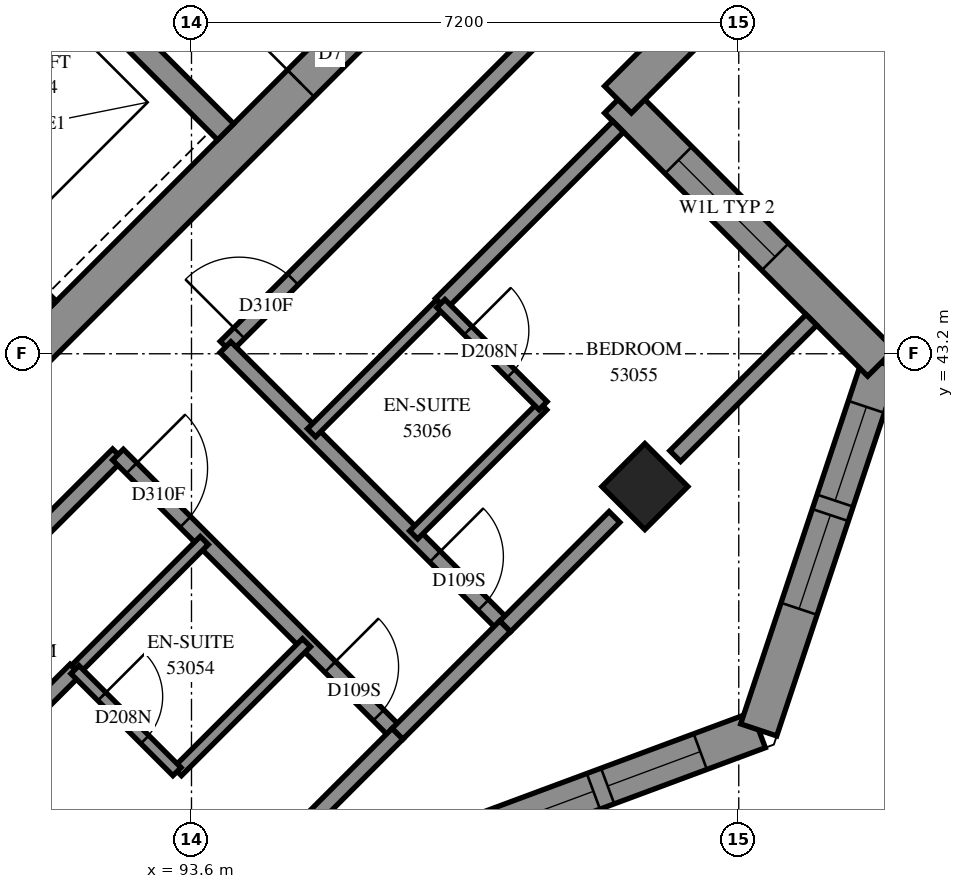
"""IFC4 building model, lengths in metres.
Left out: names, types, materials, properties, quantities, classifications, styles, units other than length and angle.
Written with IfcOpenShell. Run it as: python <this file> out.ifc"""

import sys

from ifc_helpers import new_model, si_unit, direction, frame, frame_2d, origin, origin_2d, place, context, subcontext, project, spatial, polyline, rectangle, outline, extrude, element, fill, save


model = new_model("IFC4")
c1 = context("Model", 3, precision=1e-05, world=origin(), true_north=direction((0.0, 1.0)))
c2 = subcontext(c1, "Body", "Model", "MODEL_VIEW")
j1 = project(units=[si_unit("LENGTHUNIT", "METRE"), si_unit("PLANEANGLEUNIT", "RADIAN")], contexts=[c1])
p1 = place(None, origin())
s1 = spatial("IfcSite", under=j1, at=p1, CompositionType="ELEMENT")
p2 = place(p1, origin())
s2 = spatial("IfcBuilding", under=s1, at=p2, CompositionType="ELEMENT")
p3 = place(p2, frame((0.0, 0.0, 196.4)))
s3 = spatial("IfcBuildingStorey", under=s2, at=p3, CompositionType="ELEMENT", Elevation=196.4)
p4 = place(p3, frame((99.565, 41.453, 0.0), z_axis=(0.0, 0.0, 1.0), x_axis=(0.7071067812, -0.7071067812, 0.0)))
e1 = element("IfcColumn", 1, at=p4, inside=s3, PredefinedType="COLUMN", context=c2, shape_type="SweptSolid", body=[
    extrude(rectangle(XDim=0.8, YDim=0.8, at=origin_2d()), origin(), (0.0, 0.0, 1.0), 3.1),
])
p5 = place(p3, frame((87.013, 38.731, -0.3), z_axis=(0.0, 0.0, 1.0), x_axis=(0.7071067812, 0.7071067812, 0.0)))
e2 = element("IfcWall", 2, at=p5, inside=s3, PredefinedType="SHEAR", context=c2, shape_type="SweptSolid", body=[
    extrude(rectangle(XDim=14.4, YDim=0.5, at=frame_2d((7.2, 0.0))), origin(), (0.0, 0.0, 1.0), 2.7),
])
p6 = place(p5, frame((4.55, 0.0, 0.3)))
e3 = element("IfcOpeningElement", 3, at=p6, cuts=e2, PredefinedType="OPENING", context=c2, shape_type="SweptSolid", body=[
    extrude(rectangle(XDim=1.1, YDim=2.1, at=frame_2d((0.55, 1.05))), frame((0.0, 0.26, 0.0), z_axis=(0.0, -1.0, 0.0), x_axis=(1.0, 0.0, 0.0)), (0.0, 0.0, 1.0), 0.52),
])
p7 = place(p5, frame((11.35, 0.0, 0.3)))
e4 = element("IfcOpeningElement", 4, at=p7, cuts=e2, PredefinedType="OPENING", context=c2, shape_type="SweptSolid", body=[
    extrude(rectangle(XDim=1.1, YDim=2.1, at=frame_2d((0.55, 1.05))), frame((0.0, 0.26, 0.0), z_axis=(0.0, -1.0, 0.0), x_axis=(1.0, 0.0, 0.0)), (0.0, 0.0, 1.0), 0.52),
])
p8 = place(p3, frame((81.534, 53.969, 0.0), z_axis=(0.0, 0.0, 1.0), x_axis=(0.707103309, -0.7071102534, 0.0)))
e5 = element("IfcWall", 5, at=p8, inside=s3, PredefinedType="SOLIDWALL", context=c2, shape_type="SweptSolid", body=[
    extrude(rectangle(XDim=14.4, YDim=0.3, at=frame_2d((7.2, 0.0))), origin(), (0.0, 0.0, 1.0), 3.1),
])
p9 = place(p8, frame((1.25, 0.0, 0.0)))
e6 = element("IfcOpeningElement", 6, at=p9, cuts=e5, PredefinedType="OPENING", context=c2, shape_type="SweptSolid", body=[
    extrude(rectangle(XDim=1.1, YDim=2.1, at=frame_2d((0.55, 1.05))), frame((0.0, 0.16, 0.0), z_axis=(0.0, -1.0, 0.0), x_axis=(1.0, 0.0, 0.0)), (0.0, 0.0, 1.0), 0.32),
])
p10 = place(p8, frame((4.85, 0.0, 0.0)))
e7 = element("IfcOpeningElement", 7, at=p10, cuts=e5, PredefinedType="OPENING", context=c2, shape_type="SweptSolid", body=[
    extrude(rectangle(XDim=1.1, YDim=2.1, at=frame_2d((0.55, 1.05))), frame((0.0, 0.16, 0.0), z_axis=(0.0, -1.0, 0.0), x_axis=(1.0, 0.0, 0.0)), (0.0, 0.0, 1.0), 0.32),
])
p11 = place(p8, frame((8.45, 0.0, 0.0)))
e8 = element("IfcOpeningElement", 8, at=p11, cuts=e5, PredefinedType="OPENING", context=c2, shape_type="SweptSolid", body=[
    extrude(rectangle(XDim=1.1, YDim=2.1, at=frame_2d((0.55, 1.05))), frame((0.0, 0.16, 0.0), z_axis=(0.0, -1.0, 0.0), x_axis=(1.0, 0.0, 0.0)), (0.0, 0.0, 1.0), 0.32),
])
p12 = place(p8, frame((12.05, 0.0, 0.0)))
e9 = element("IfcOpeningElement", 9, at=p12, cuts=e5, PredefinedType="OPENING", context=c2, shape_type="SweptSolid", body=[
    extrude(rectangle(XDim=1.1, YDim=2.1, at=frame_2d((0.55, 1.05))), frame((0.0, 0.16, 0.0), z_axis=(0.0, -1.0, 0.0), x_axis=(1.0, 0.0, 0.0)), (0.0, 0.0, 1.0), 0.32),
])
p13 = place(p3, frame((88.958, 51.211, 0.0), z_axis=(0.0, 0.0, 1.0), x_axis=(0.7070998367, -0.7071137256, 0.0)))
e10 = element("IfcWall", 10, at=p13, inside=s3, PredefinedType="SOLIDWALL", context=c2, shape_type="SweptSolid", body=[
    extrude(rectangle(XDim=7.2, YDim=0.3, at=frame_2d((3.6, 0.0))), origin(), (0.0, 0.0, 1.0), 3.1),
])
p14 = place(p3, frame((96.118, 36.415, 0.0), z_axis=(0.0, 0.0, 1.0), x_axis=(0.9374238577, 0.3481903374, 0.0)))
e11 = element("IfcWall", 11, at=p14, inside=s3, PredefinedType="SOLIDWALL", context=c2, shape_type="SweptSolid", body=[
    extrude(outline(polyline([(0.115, -0.25), (5.395, -0.25), (5.155, 0.25), (-0.115, 0.25), (0.115, -0.25)])), origin(), (0.0, 0.0, 1.0), 3.1),
])
p15 = place(p14, frame((1.655, 0.0, 0.45)))
e12 = element("IfcOpeningElement", 12, at=p15, cuts=e11, PredefinedType="OPENING", context=c2, shape_type="SweptSolid", body=[
    extrude(rectangle(XDim=1.3, YDim=2.5, at=frame_2d((0.65, 1.25))), frame((0.0, 0.26, 0.0), z_axis=(0.0, -1.0, 0.0), x_axis=(1.0, 0.0, 0.0)), (0.0, 0.0, 1.0), 0.52),
])
p16 = place(p14, frame((3.155, 0.0, 0.45)))
e13 = element("IfcOpeningElement", 13, at=p16, cuts=e11, PredefinedType="OPENING", context=c2, shape_type="SweptSolid", body=[
    extrude(rectangle(XDim=1.3, YDim=2.5, at=frame_2d((0.65, 1.25))), frame((0.0, 0.26, 0.0), z_axis=(0.0, -1.0, 0.0), x_axis=(1.0, 0.0, 0.0)), (0.0, 0.0, 1.0), 0.52),
])
p17 = place(p3, frame((101.062, 38.252, 0.0), z_axis=(0.0, 0.0, 1.0), x_axis=(0.3162395484, 0.9486793705, 0.0)))
e14 = element("IfcWall", 14, at=p17, inside=s3, PredefinedType="SOLIDWALL", context=c2, shape_type="SweptSolid", body=[
    extrude(outline(polyline([(-0.12, -0.25), (5.247, -0.25), (4.938, 0.25), (0.12, 0.25), (-0.12, -0.25)])), origin(), (0.0, 0.0, 1.0), 3.1),
])
p18 = place(p17, frame((1.68, 0.0, 0.45)))
e15 = element("IfcOpeningElement", 15, at=p18, cuts=e14, PredefinedType="OPENING", context=c2, shape_type="SweptSolid", body=[
    extrude(rectangle(XDim=1.3, YDim=2.5, at=frame_2d((0.65, 1.25))), frame((0.0, 0.26, 0.0), z_axis=(0.0, -1.0, 0.0), x_axis=(1.0, 0.0, 0.0)), (0.0, 0.0, 1.0), 0.52),
])
p19 = place(p17, frame((3.18, 0.0, 0.45)))
e16 = element("IfcOpeningElement", 16, at=p19, cuts=e14, PredefinedType="OPENING", context=c2, shape_type="SweptSolid", body=[
    extrude(rectangle(XDim=1.3, YDim=2.5, at=frame_2d((0.65, 1.25))), frame((0.0, 0.26, 0.0), z_axis=(0.0, -1.0, 0.0), x_axis=(1.0, 0.0, 0.0)), (0.0, 0.0, 1.0), 0.52),
])
p20 = place(p3, frame((102.673, 43.083, 0.0), z_axis=(0.0, 0.0, 1.0), x_axis=(-0.7071067812, 0.7071067812, 0.0)))
e17 = element("IfcWall", 17, at=p20, inside=s3, PredefinedType="SOLIDWALL", context=c2, shape_type="SweptSolid", body=[
    extrude(outline(polyline([(-0.154, -0.25), (4.646, -0.25), (5.146, 0.25), (0.154, 0.25), (-0.154, -0.25)])), origin(), (0.0, 0.0, 1.0), 3.1),
])
p21 = place(p20, frame((1.97, 0.0, 0.6)))
e18 = element("IfcOpeningElement", 18, at=p21, cuts=e17, PredefinedType="OPENING", context=c2, shape_type="SweptSolid", body=[
    extrude(rectangle(XDim=1.8, YDim=1.9, at=frame_2d((0.9, 0.95))), frame((0.0, 0.26, 0.0), z_axis=(0.0, -1.0, 0.0), x_axis=(1.0, 0.0, 0.0)), (0.0, 0.0, 1.0), 0.52),
])
p22 = place(p3, frame((99.211, 46.544, 0.0), z_axis=(0.0, 0.0, 1.0), x_axis=(0.7071067812, 0.7071067812, 0.0)))
e19 = element("IfcWall", 19, at=p22, inside=s3, PredefinedType="SOLIDWALL", context=c2, shape_type="SweptSolid", body=[
    extrude(outline(polyline([(0.25, -0.25), (6.011, -0.25), (5.346, 0.25), (-0.25, 0.25), (0.25, -0.25)])), origin(), (0.0, 0.0, 1.0), 3.1),
])
p23 = place(p22, frame((1.125, 0.0, 0.6)))
e20 = element("IfcOpeningElement", 20, at=p23, cuts=e19, PredefinedType="OPENING", context=c2, shape_type="SweptSolid", body=[
    extrude(rectangle(XDim=1.8, YDim=1.9, at=frame_2d((0.9, 0.95))), frame((0.0, 0.26, 0.0), z_axis=(0.0, -1.0, 0.0), x_axis=(1.0, 0.0, 0.0)), (0.0, 0.0, 1.0), 0.52),
])
p24 = place(p3, frame((84.981, 31.956, 0.0), z_axis=(0.0, 0.0, 1.0), x_axis=(0.7072314232, 0.7069821172, 0.0)))
e21 = element("IfcWall", 21, at=p24, inside=s3, PredefinedType="PARTITIONING", context=c2, shape_type="SweptSolid", body=[
    extrude(rectangle(XDim=10.028, YDim=0.2, at=frame_2d((5.014, 0.0))), origin(), (0.0, 0.0, 1.0), 3.1),
])
p25 = place(p3, frame((94.049, 43.293, 0.0), z_axis=(0.0, 0.0, 1.0), x_axis=(0.7071067812, 0.7071067812, 0.0)))
e22 = element("IfcWall", 22, at=p25, inside=s3, PredefinedType="PARTITIONING", context=c2, shape_type="SweptSolid", body=[
    extrude(rectangle(XDim=8.2, YDim=0.2, at=frame_2d((4.1, 0.0))), origin(), (0.0, 0.0, 1.0), 3.1),
])
p26 = place(p25, frame((0.252, 0.0, 0.0)))
e23 = element("IfcOpeningElement", 23, at=p26, cuts=e22, PredefinedType="OPENING", context=c2, shape_type="SweptSolid", body=[
    extrude(rectangle(XDim=1.0, YDim=2.1, at=frame_2d((0.5, 1.05))), frame((0.0, 0.11, 0.0), z_axis=(0.0, -1.0, 0.0), x_axis=(1.0, 0.0, 0.0)), (0.0, 0.0, 1.0), 0.22),
])
p27 = place(p3, frame((86.835, 36.079, 0.0), z_axis=(0.0, 0.0, 1.0), x_axis=(0.7071067812, 0.7071067812, 0.0)))
e24 = element("IfcWall", 24, at=p27, inside=s3, PredefinedType="PARTITIONING", context=c2, shape_type="SweptSolid", body=[
    extrude(rectangle(XDim=8.2, YDim=0.2, at=frame_2d((4.1, 0.0))), origin(), (0.0, 0.0, 1.0), 3.1),
])
p28 = place(p3, frame((94.047, 43.287, 0.0), z_axis=(0.0, 0.0, 1.0), x_axis=(0.7071067812, -0.7071067812, 0.0)))
e25 = element("IfcWall", 25, at=p28, inside=s3, PredefinedType="PARTITIONING", context=c2, shape_type="SweptSolid", body=[
    extrude(rectangle(XDim=5.199, YDim=0.2, at=frame_2d((2.599, 0.0))), origin(), (0.0, 0.0, 1.0), 3.1),
])
p29 = place(p28, frame((3.898, 0.0, 0.0)))
e26 = element("IfcOpeningElement", 26, at=p29, cuts=e25, PredefinedType="OPENING", context=c2, shape_type="SweptSolid", body=[
    extrude(rectangle(XDim=0.9, YDim=2.1, at=frame_2d((0.45, 1.05))), frame((0.0, 0.11, 0.0), z_axis=(0.0, -1.0, 0.0), x_axis=(1.0, 0.0, 0.0)), (0.0, 0.0, 1.0), 0.22),
])
p30 = place(p3, frame((92.633, 41.873, 0.0), z_axis=(0.0, 0.0, 1.0), x_axis=(0.7071067812, -0.7071067812, 0.0)))
e27 = element("IfcWall", 27, at=p30, inside=s3, PredefinedType="PARTITIONING", context=c2, shape_type="SweptSolid", body=[
    extrude(rectangle(XDim=5.199, YDim=0.2, at=frame_2d((2.599, 0.0))), origin(), (0.0, 0.0, 1.0), 3.1),
])
p31 = place(p30, frame((0.253, 0.0, 0.0)))
e28 = element("IfcOpeningElement", 28, at=p31, cuts=e27, PredefinedType="OPENING", context=c2, shape_type="SweptSolid", body=[
    extrude(rectangle(XDim=1.0, YDim=2.1, at=frame_2d((0.5, 1.05))), frame((0.0, 0.11, 0.0), z_axis=(0.0, -1.0, 0.0), x_axis=(1.0, 0.0, 0.0)), (0.0, 0.0, 1.0), 0.22),
])
p32 = place(p30, frame((3.948, 0.0, 0.0)))
e29 = element("IfcOpeningElement", 29, at=p32, cuts=e27, PredefinedType="OPENING", context=c2, shape_type="SweptSolid", body=[
    extrude(rectangle(XDim=0.9, YDim=2.1, at=frame_2d((0.45, 1.05))), frame((0.0, 0.11, 0.0), z_axis=(0.0, -1.0, 0.0), x_axis=(1.0, 0.0, 0.0)), (0.0, 0.0, 1.0), 0.22),
])
p33 = place(p3, frame((96.88, 43.856, 0.0), z_axis=(0.0, 0.0, 1.0), x_axis=(0.7074098182, 0.7068036142, 0.0)))
e30 = element("IfcWall", 30, at=p33, inside=s3, PredefinedType="PARTITIONING", context=c2, shape_type="SweptSolid", body=[
    extrude(rectangle(XDim=3.299, YDim=0.2, at=frame_2d((1.65, 0.0))), origin(), (0.0, 0.0, 1.0), 3.1),
])
p34 = place(p3, frame((99.964, 41.854, 0.0), z_axis=(0.0, 0.0, 1.0), x_axis=(0.7071265121, 0.7070870497, 0.0)))
e31 = element("IfcWall", 31, at=p34, inside=s3, PredefinedType="PARTITIONING", context=c2, shape_type="SweptSolid", body=[
    extrude(rectangle(XDim=2.534, YDim=0.2, at=frame_2d((1.267, 0.0))), origin(), (0.0, 0.0, 1.0), 3.1),
])
for number, where, z_axis, x_axis in (
    (32, (96.523, 40.817, 0.0), (0.0, 0.0, 1.0), (0.707, 0.707, 0.0)),
    (33, (95.179, 42.161, 0.0), (0.0, 0.0, 1.0), (0.707, 0.707, 0.0)),
):
    element("IfcWall", number, at=place(p3, frame(where, z_axis=z_axis, x_axis=x_axis)), inside=s3, PredefinedType="PARTITIONING", context=c2, shape_type="SweptSolid", body=[
        extrude(rectangle(XDim=2.401, YDim=0.15, at=frame_2d((1.201, 0.0))), origin(), (0.0, 0.0, 1.0), 3.1),
    ])
for number, where, z_axis, x_axis in (
    (34, (92.072, 39.046, 0.0), (0.0, 0.0, 1.0), (0.707, 0.708, 0.0)),
    (35, (93.415, 37.703, 0.0), (0.0, 0.0, 1.0), (0.708, 0.707, 0.0)),
):
    element("IfcWall", number, at=place(p3, frame(where, z_axis=z_axis, x_axis=x_axis)), inside=s3, PredefinedType="PARTITIONING", context=c2, shape_type="SweptSolid", body=[
        extrude(rectangle(XDim=2.4, YDim=0.15, at=frame_2d((1.2, 0.0))), origin(), (0.0, 0.0, 1.0), 3.1),
    ])
p35 = place(p3, frame((97.727, 39.613, 0.0), z_axis=(0.0, 0.0, 1.0), x_axis=(0.7066152229, 0.7075979979, 0.0)))
e36 = element("IfcWall", 36, at=p35, inside=s3, PredefinedType="PARTITIONING", context=c2, shape_type="SweptSolid", body=[
    extrude(rectangle(XDim=2.035, YDim=0.2, at=frame_2d((1.018, 0.0))), origin(), (0.0, 0.0, 1.0), 2.6),
])
p36 = place(p3, frame((94.873, 36.763, 0.0), z_axis=(0.0, 0.0, 1.0), x_axis=(0.7071067812, 0.7071067812, 0.0)))
e37 = element("IfcWall", 37, at=p36, inside=s3, PredefinedType="PARTITIONING", context=c2, shape_type="SweptSolid", body=[
    extrude(rectangle(XDim=2.034, YDim=0.2, at=frame_2d((1.017, 0.0))), origin(), (0.0, 0.0, 1.0), 2.6),
])
p37 = place(p3, frame((96.311, 38.201, 0.0), z_axis=(0.0, 0.0, 1.0), x_axis=(0.7071067812, 0.7071067812, 0.0)))
e38 = element("IfcWall", 38, at=p37, inside=s3, PredefinedType="PARTITIONING", context=c2, shape_type="SweptSolid", body=[
    extrude(rectangle(XDim=2.0, YDim=0.2, at=frame_2d((1.0, 0.0))), origin(), (0.0, 0.0, 1.0), 2.6),
])
p38 = place(p3, frame((96.881, 43.861, 0.0), z_axis=(0.0, 0.0, 1.0), x_axis=(0.7071067812, -0.7071067812, 0.0)))
e39 = element("IfcWall", 39, at=p38, inside=s3, PredefinedType="PARTITIONING", context=c2, shape_type="SweptSolid", body=[
    extrude(rectangle(XDim=1.901, YDim=0.15, at=frame_2d((0.95, 0.0))), origin(), (0.0, 0.0, 1.0), 3.1),
])
p39 = place(p38, frame((0.505, 0.0, 0.0)))
e40 = element("IfcOpeningElement", 40, at=p39, cuts=e39, PredefinedType="OPENING", context=c2, shape_type="SweptSolid", body=[
    extrude(rectangle(XDim=0.8, YDim=2.1, at=frame_2d((0.4, 1.05))), frame((0.0, 0.085, 0.0), z_axis=(0.0, -1.0, 0.0), x_axis=(1.0, 0.0, 0.0)), (0.0, 0.0, 1.0), 0.17),
])
p40 = place(p3, frame((92.067, 39.045, 0.0), z_axis=(0.0, 0.0, 1.0), x_axis=(0.7071067812, -0.7071067812, 0.0)))
e41 = element("IfcWall", 41, at=p40, inside=s3, PredefinedType="PARTITIONING", context=c2, shape_type="SweptSolid", body=[
    extrude(rectangle(XDim=1.898, YDim=0.15, at=frame_2d((0.949, 0.0))), origin(), (0.0, 0.0, 1.0), 3.1),
])
p41 = place(p40, frame((0.501, 0.0, 0.0)))
e42 = element("IfcOpeningElement", 42, at=p41, cuts=e41, PredefinedType="OPENING", context=c2, shape_type="SweptSolid", body=[
    extrude(rectangle(XDim=0.8, YDim=2.1, at=frame_2d((0.4, 1.05))), frame((0.0, 0.085, 0.0), z_axis=(0.0, -1.0, 0.0), x_axis=(1.0, 0.0, 0.0)), (0.0, 0.0, 1.0), 0.17),
])
p42 = place(p15, origin())
e43 = element("IfcWindow", 43, at=p42, inside=s3, PartitioningType="SINGLE_PANEL", PredefinedType="WINDOW", context=c2, shape_type="SweptSolid", body=[
    extrude(rectangle(XDim=1.3, YDim=2.5, at=frame_2d((0.65, 1.25))), frame((0.0, 0.18, 0.0), z_axis=(0.0, -1.0, 0.0), x_axis=(1.0, 0.0, 0.0)), (0.0, 0.0, 1.0), 0.06),
])
fill(e12, e43)
p43 = place(p16, origin())
e44 = element("IfcWindow", 44, at=p43, inside=s3, PartitioningType="SINGLE_PANEL", PredefinedType="WINDOW", context=c2, shape_type="SweptSolid", body=[
    extrude(rectangle(XDim=1.3, YDim=2.5, at=frame_2d((0.65, 1.25))), frame((0.0, 0.18, 0.0), z_axis=(0.0, -1.0, 0.0), x_axis=(1.0, 0.0, 0.0)), (0.0, 0.0, 1.0), 0.06),
])
fill(e13, e44)
p44 = place(p18, origin())
e45 = element("IfcWindow", 45, at=p44, inside=s3, PartitioningType="SINGLE_PANEL", PredefinedType="WINDOW", context=c2, shape_type="SweptSolid", body=[
    extrude(rectangle(XDim=1.3, YDim=2.5, at=frame_2d((0.65, 1.25))), frame((0.0, 0.18, 0.0), z_axis=(0.0, -1.0, 0.0), x_axis=(1.0, 0.0, 0.0)), (0.0, 0.0, 1.0), 0.06),
])
fill(e15, e45)
p45 = place(p19, origin())
e46 = element("IfcWindow", 46, at=p45, inside=s3, PartitioningType="SINGLE_PANEL", PredefinedType="WINDOW", context=c2, shape_type="SweptSolid", body=[
    extrude(rectangle(XDim=1.3, YDim=2.5, at=frame_2d((0.65, 1.25))), frame((0.0, 0.18, 0.0), z_axis=(0.0, -1.0, 0.0), x_axis=(1.0, 0.0, 0.0)), (0.0, 0.0, 1.0), 0.06),
])
fill(e16, e46)
p46 = place(p21, origin())
e47 = element("IfcWindow", 47, at=p46, inside=s3, PartitioningType="SINGLE_PANEL", PredefinedType="WINDOW", context=c2, shape_type="SweptSolid", body=[
    extrude(rectangle(XDim=1.8, YDim=1.9, at=frame_2d((0.9, 0.95))), frame((0.0, 0.18, 0.0), z_axis=(0.0, -1.0, 0.0), x_axis=(1.0, 0.0, 0.0)), (0.0, 0.0, 1.0), 0.06),
])
fill(e18, e47)
p47 = place(p7, origin())
e48 = element("IfcDoor", 48, at=p47, inside=s3, OperationType="SINGLE_SWING_RIGHT", PredefinedType="DOOR", context=c2, shape_type="SweptSolid", body=[
    extrude(rectangle(XDim=1.1, YDim=2.1, at=frame_2d((0.55, 1.05))), frame((0.0, 0.025, 0.0), z_axis=(0.0, -1.0, 0.0), x_axis=(1.0, 0.0, 0.0)), (0.0, 0.0, 1.0), 0.05),
])
fill(e4, e48)
p48 = place(p26, origin())
e49 = element("IfcDoor", 49, at=p48, inside=s3, OperationType="SINGLE_SWING_RIGHT", PredefinedType="DOOR", context=c2, shape_type="SweptSolid", body=[
    extrude(rectangle(XDim=1.0, YDim=2.1, at=frame_2d((0.5, 1.05))), frame((0.0, 0.025, 0.0), z_axis=(0.0, -1.0, 0.0), x_axis=(1.0, 0.0, 0.0)), (0.0, 0.0, 1.0), 0.05),
])
fill(e23, e49)
p49 = place(p31, origin())
e50 = element("IfcDoor", 50, at=p49, inside=s3, OperationType="SINGLE_SWING_RIGHT", PredefinedType="DOOR", context=c2, shape_type="SweptSolid", body=[
    extrude(rectangle(XDim=1.0, YDim=2.1, at=frame_2d((0.5, 1.05))), frame((0.0, 0.025, 0.0), z_axis=(0.0, -1.0, 0.0), x_axis=(1.0, 0.0, 0.0)), (0.0, 0.0, 1.0), 0.05),
])
fill(e28, e50)
p50 = place(p32, origin())
e51 = element("IfcDoor", 51, at=p50, inside=s3, OperationType="SINGLE_SWING_LEFT", PredefinedType="DOOR", context=c2, shape_type="SweptSolid", body=[
    extrude(rectangle(XDim=0.9, YDim=2.1, at=frame_2d((0.45, 1.05))), frame((0.0, 0.025, 0.0), z_axis=(0.0, -1.0, 0.0), x_axis=(1.0, 0.0, 0.0)), (0.0, 0.0, 1.0), 0.05),
])
fill(e29, e51)
p51 = place(p41, origin())
e52 = element("IfcDoor", 52, at=p51, inside=s3, OperationType="SINGLE_SWING_RIGHT", PredefinedType="DOOR", context=c2, shape_type="SweptSolid", body=[
    extrude(rectangle(XDim=0.8, YDim=2.1, at=frame_2d((0.4, 1.05))), frame((0.0, 0.025, 0.0), z_axis=(0.0, -1.0, 0.0), x_axis=(1.0, 0.0, 0.0)), (0.0, 0.0, 1.0), 0.05),
])
fill(e42, e52)
p52 = place(p29, origin())
e53 = element("IfcDoor", 53, at=p52, inside=s3, OperationType="SINGLE_SWING_RIGHT", PredefinedType="DOOR", context=c2, shape_type="SweptSolid", body=[
    extrude(rectangle(XDim=0.9, YDim=2.1, at=frame_2d((0.45, 1.05))), frame((0.0, 0.025, 0.0), z_axis=(0.0, -1.0, 0.0), x_axis=(1.0, 0.0, 0.0)), (0.0, 0.0, 1.0), 0.05),
])
fill(e26, e53)
p53 = place(p39, origin())
e54 = element("IfcDoor", 54, at=p53, inside=s3, OperationType="SINGLE_SWING_RIGHT", PredefinedType="DOOR", context=c2, shape_type="SweptSolid", body=[
    extrude(rectangle(XDim=0.8, YDim=2.1, at=frame_2d((0.4, 1.05))), frame((0.0, 0.025, 0.0), z_axis=(0.0, -1.0, 0.0), x_axis=(1.0, 0.0, 0.0)), (0.0, 0.0, 1.0), 0.05),
])
fill(e40, e54)
save(model, sys.argv[1])
